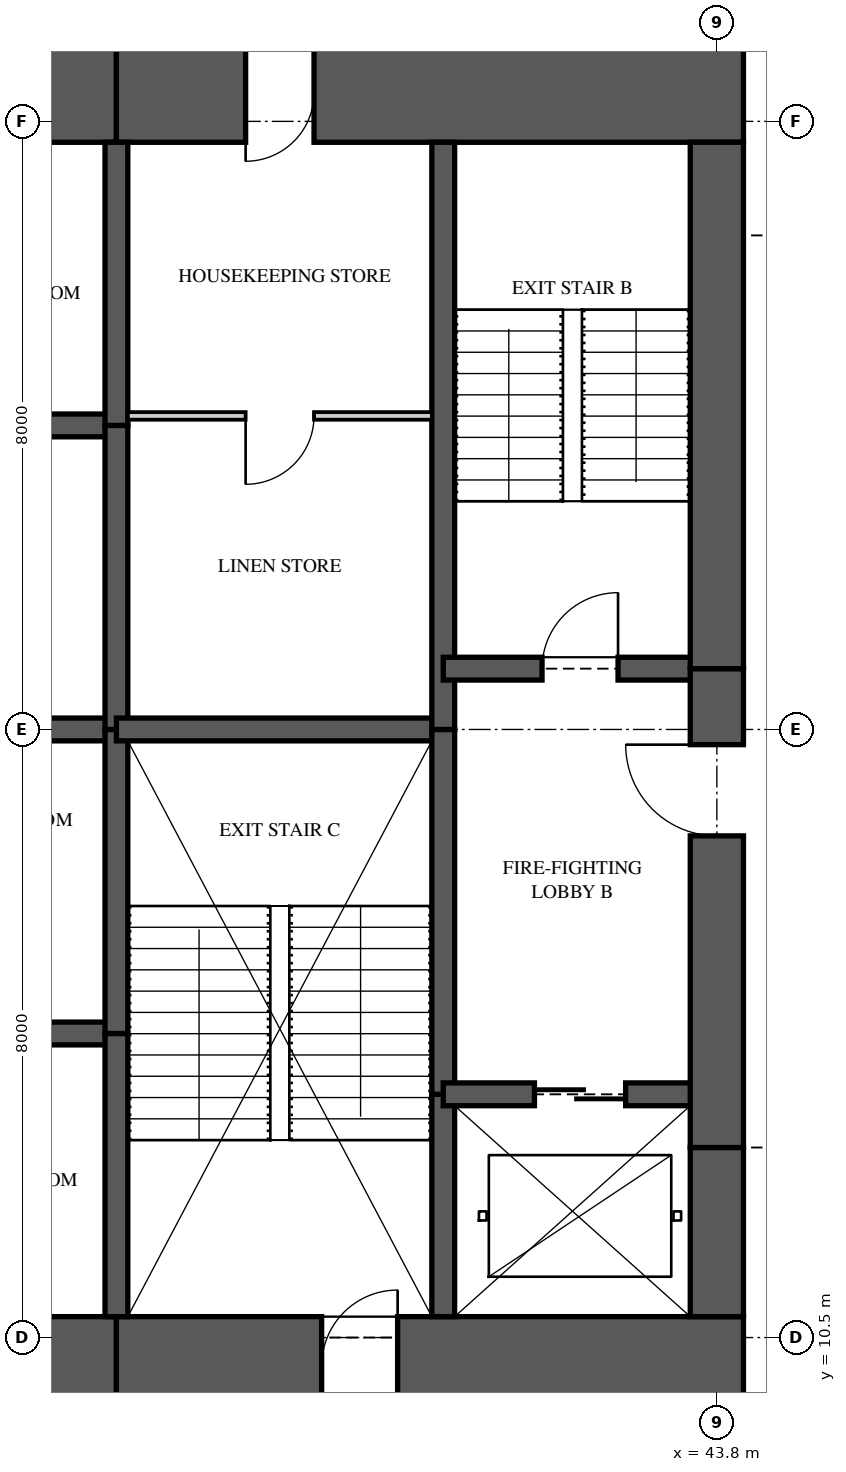
"""IFC4 building model, lengths in metres.
Left out: names, types, materials, properties, quantities, classifications, styles, units other than length and angle.
Written with IfcOpenShell. Run it as: python <this file> out.ifc"""

import sys

from ifc_helpers import new_model, si_unit, direction, frame, frame_2d, origin, place, context, subcontext, project, spatial, rectangle, extrude, element, fill, save


model = new_model("IFC4")
c1 = context("Model", 3, precision=1e-05, world=origin(), true_north=direction((0.0, 1.0)))
c2 = subcontext(c1, "Body", "Model", "MODEL_VIEW")
j1 = project(units=[si_unit("LENGTHUNIT", "METRE"), si_unit("PLANEANGLEUNIT", "RADIAN")], contexts=[c1])
p1 = place(None, origin())
s1 = spatial("IfcSite", under=j1, at=p1, CompositionType="ELEMENT")
p2 = place(p1, origin())
s2 = spatial("IfcBuilding", under=s1, at=p2, CompositionType="ELEMENT")
p3 = place(p2, frame((0.0, 0.0, 184.5)))
s3 = spatial("IfcBuildingStorey", under=s2, at=p3, CompositionType="ELEMENT", Elevation=184.5)
p4 = place(p3, frame((31.6, 10.125, 0.0), z_axis=(0.0, 0.0, 1.0), x_axis=(1.0, 0.0, 0.0)))
e1 = element("IfcWall", 1, at=p4, inside=s3, PredefinedType="SHEAR", context=c2, shape_type="SweptSolid", body=[
    extrude(rectangle(XDim=4.3, YDim=1.3, at=frame_2d((2.15, 0.0))), origin(), (0.0, 0.0, 1.0), 3.35),
])
p5 = place(p3, frame((35.9, 10.125, 0.0), z_axis=(0.0, 0.0, 1.0), x_axis=(1.0, 0.0, 0.0)))
e2 = element("IfcWall", 2, at=p5, inside=s3, PredefinedType="SHEAR", context=c2, shape_type="SweptSolid", body=[
    extrude(rectangle(XDim=8.25, YDim=1.3, at=frame_2d((4.125, 0.0))), origin(), (0.0, 0.0, 1.0), 3.35),
])
p6 = place(p5, frame((2.7, 0.0, 0.0)))
e3 = element("IfcOpeningElement", 3, at=p6, cuts=e2, PredefinedType="OPENING", context=c2, shape_type="SweptSolid", body=[
    extrude(rectangle(XDim=1.0, YDim=2.1, at=frame_2d((0.5, 1.05))), frame((0.0, 0.66, 0.0), z_axis=(0.0, -1.0, 0.0), x_axis=(1.0, 0.0, 0.0)), (0.0, 0.0, 1.0), 1.32),
])
p7 = place(p3, frame((44.15, 26.875, 0.0), z_axis=(0.0, 0.0, 1.0), x_axis=(-1.0, 0.0, 0.0)))
e4 = element("IfcWall", 4, at=p7, inside=s3, PredefinedType="SHEAR", context=c2, shape_type="SweptSolid", body=[
    extrude(rectangle(XDim=8.25, YDim=1.3, at=frame_2d((4.125, 0.0))), origin(), (0.0, 0.0, 1.0), 3.35),
])
p8 = place(p7, frame((5.65, 0.0, 0.0)))
e5 = element("IfcOpeningElement", 5, at=p8, cuts=e4, PredefinedType="OPENING", context=c2, shape_type="SweptSolid", body=[
    extrude(rectangle(XDim=0.9, YDim=2.1, at=frame_2d((0.45, 1.05))), frame((0.0, 0.66, 0.0), z_axis=(0.0, -1.0, 0.0), x_axis=(1.0, 0.0, 0.0)), (0.0, 0.0, 1.0), 1.32),
])
p9 = place(p3, frame((35.9, 26.875, 0.0), z_axis=(0.0, 0.0, 1.0), x_axis=(-1.0, 0.0, 0.0)))
e6 = element("IfcWall", 6, at=p9, inside=s3, PredefinedType="SHEAR", context=c2, shape_type="SweptSolid", body=[
    extrude(rectangle(XDim=4.3, YDim=1.3, at=frame_2d((2.15, 0.0))), origin(), (0.0, 0.0, 1.0), 3.35),
])
p10 = place(p3, frame((43.8, 10.775, 0.0), z_axis=(0.0, 0.0, 1.0), x_axis=(0.0, 1.0, 0.0)))
e7 = element("IfcWall", 7, at=p10, inside=s3, PredefinedType="SHEAR", context=c2, shape_type="SweptSolid", body=[
    extrude(rectangle(XDim=2.225, YDim=0.7, at=frame_2d((1.113, 0.0))), origin(), (0.0, 0.0, 1.0), 3.35),
])
p11 = place(p3, frame((43.8, 13.0, 0.0), z_axis=(0.0, 0.0, 1.0), x_axis=(0.0, 1.0, 0.0)))
e8 = element("IfcWall", 8, at=p11, inside=s3, PredefinedType="SHEAR", context=c2, shape_type="SweptSolid", body=[
    extrude(rectangle(XDim=6.3, YDim=0.7, at=frame_2d((3.15, 0.0))), origin(), (0.0, 0.0, 1.0), 3.35),
])
p12 = place(p11, frame((4.1, 0.0, 0.0)))
e9 = element("IfcOpeningElement", 9, at=p12, cuts=e8, PredefinedType="OPENING", context=c2, shape_type="SweptSolid", body=[
    extrude(rectangle(XDim=1.2, YDim=2.2, at=frame_2d((0.6, 1.1))), frame((0.0, 0.36, 0.0), z_axis=(0.0, -1.0, 0.0), x_axis=(1.0, 0.0, 0.0)), (0.0, 0.0, 1.0), 0.72),
])
p13 = place(p3, frame((43.8, 19.3, 0.0), z_axis=(0.0, 0.0, 1.0), x_axis=(0.0, 1.0, 0.0)))
e10 = element("IfcWall", 10, at=p13, inside=s3, PredefinedType="SHEAR", context=c2, shape_type="SweptSolid", body=[
    extrude(rectangle(XDim=6.925, YDim=0.7, at=frame_2d((3.462, 0.0))), origin(), (0.0, 0.0, 1.0), 3.35),
])
p14 = place(p3, frame((35.9, 10.775, 0.0), z_axis=(0.0, 0.0, 1.0), x_axis=(0.0, 1.0, 0.0)))
e11 = element("IfcWall", 11, at=p14, inside=s3, PredefinedType="SHEAR", context=c2, shape_type="SweptSolid", body=[
    extrude(rectangle(XDim=3.725, YDim=0.3, at=frame_2d((1.863, 0.0))), origin(), (0.0, 0.0, 1.0), 3.35),
])
for number, where, z_axis, x_axis in (
    (12, (35.9, 14.5, 0.0), (0.0, 0.0, 1.0), (0.0, 1.0, 0.0)),
    (13, (35.9, 18.5, 0.0), (0.0, 0.0, 1.0), (0.0, 1.0, 0.0)),
):
    element("IfcWall", number, at=place(p3, frame(where, z_axis=z_axis, x_axis=x_axis)), inside=s3, PredefinedType="SHEAR", context=c2, shape_type="SweptSolid", body=[
        extrude(rectangle(XDim=4.0, YDim=0.3, at=frame_2d((2.0, 0.0))), origin(), (0.0, 0.0, 1.0), 3.35),
    ])
p15 = place(p3, frame((35.9, 22.5, 0.0), z_axis=(0.0, 0.0, 1.0), x_axis=(0.0, 1.0, 0.0)))
e14 = element("IfcWall", 14, at=p15, inside=s3, PredefinedType="SHEAR", context=c2, shape_type="SweptSolid", body=[
    extrude(rectangle(XDim=3.725, YDim=0.3, at=frame_2d((1.863, 0.0))), origin(), (0.0, 0.0, 1.0), 3.35),
])
p16 = place(p3, frame((40.2, 10.775, 0.0), z_axis=(0.0, 0.0, 1.0), x_axis=(0.0, 1.0, 0.0)))
e15 = element("IfcWall", 15, at=p16, inside=s3, PredefinedType="SHEAR", context=c2, shape_type="SweptSolid", body=[
    extrude(rectangle(XDim=2.925, YDim=0.3, at=frame_2d((1.462, 0.0))), origin(), (0.0, 0.0, 1.0), 3.35),
])
p17 = place(p3, frame((40.2, 13.7, 0.0), z_axis=(0.0, 0.0, 1.0), x_axis=(0.0, 1.0, 0.0)))
e16 = element("IfcWall", 16, at=p17, inside=s3, PredefinedType="SHEAR", context=c2, shape_type="SweptSolid", body=[
    extrude(rectangle(XDim=4.8, YDim=0.3, at=frame_2d((2.4, 0.0))), origin(), (0.0, 0.0, 1.0), 3.35),
])
p18 = place(p3, frame((40.2, 18.5, 0.0), z_axis=(0.0, 0.0, 1.0), x_axis=(0.0, 1.0, 0.0)))
e17 = element("IfcWall", 17, at=p18, inside=s3, PredefinedType="SHEAR", context=c2, shape_type="SweptSolid", body=[
    extrude(rectangle(XDim=7.725, YDim=0.3, at=frame_2d((3.863, 0.0))), origin(), (0.0, 0.0, 1.0), 3.35),
])
for number, where, z_axis, x_axis in (
    (18, (31.6, 14.5, 0.0), (0.0, 0.0, 1.0), (1.0, 0.0, 0.0)),
    (19, (31.6, 18.5, 0.0), (0.0, 0.0, 1.0), (1.0, 0.0, 0.0)),
    (20, (31.6, 22.5, 0.0), (0.0, 0.0, 1.0), (1.0, 0.0, 0.0)),
):
    element("IfcWall", number, at=place(p3, frame(where, z_axis=z_axis, x_axis=x_axis)), inside=s3, PredefinedType="SHEAR", context=c2, shape_type="SweptSolid", body=[
        extrude(rectangle(XDim=4.3, YDim=0.3, at=frame_2d((2.15, 0.0))), origin(), (0.0, 0.0, 1.0), 3.35),
    ])
p19 = place(p3, frame((35.9, 18.5, 0.0), z_axis=(0.0, 0.0, 1.0), x_axis=(1.0, 0.0, 0.0)))
e21 = element("IfcWall", 21, at=p19, inside=s3, PredefinedType="SHEAR", context=c2, shape_type="SweptSolid", body=[
    extrude(rectangle(XDim=4.3, YDim=0.3, at=frame_2d((2.15, 0.0))), origin(), (0.0, 0.0, 1.0), 3.35),
])
p20 = place(p3, frame((40.2, 13.7, 0.0), z_axis=(0.0, 0.0, 1.0), x_axis=(1.0, 0.0, 0.0)))
e22 = element("IfcWall", 22, at=p20, inside=s3, PredefinedType="SHEAR", context=c2, shape_type="SweptSolid", body=[
    extrude(rectangle(XDim=3.6, YDim=0.3, at=frame_2d((1.8, 0.0))), origin(), (0.0, 0.0, 1.0), 3.35),
])
p21 = place(p20, frame((1.2, 0.0, 0.0)))
e23 = element("IfcOpeningElement", 23, at=p21, cuts=e22, PredefinedType="OPENING", context=c2, shape_type="SweptSolid", body=[
    extrude(rectangle(XDim=1.2, YDim=2.1, at=frame_2d((0.6, 1.05))), frame((0.0, 0.16, 0.0), z_axis=(0.0, -1.0, 0.0), x_axis=(1.0, 0.0, 0.0)), (0.0, 0.0, 1.0), 0.32),
])
p22 = place(p3, frame((40.2, 19.3, 0.0), z_axis=(0.0, 0.0, 1.0), x_axis=(1.0, 0.0, 0.0)))
e24 = element("IfcWall", 24, at=p22, inside=s3, PredefinedType="SHEAR", context=c2, shape_type="SweptSolid", body=[
    extrude(rectangle(XDim=3.6, YDim=0.3, at=frame_2d((1.8, 0.0))), origin(), (0.0, 0.0, 1.0), 3.35),
])
p23 = place(p22, frame((1.3, 0.0, 0.0)))
e25 = element("IfcOpeningElement", 25, at=p23, cuts=e24, PredefinedType="OPENING", context=c2, shape_type="SweptSolid", body=[
    extrude(rectangle(XDim=1.0, YDim=2.1, at=frame_2d((0.5, 1.05))), frame((0.0, 0.16, 0.0), z_axis=(0.0, -1.0, 0.0), x_axis=(1.0, 0.0, 0.0)), (0.0, 0.0, 1.0), 0.32),
])
p24 = place(p3, frame((36.05, 22.625, 0.0), z_axis=(0.0, 0.0, 1.0), x_axis=(1.0, 0.0, 0.0)))
e26 = element("IfcWall", 26, at=p24, inside=s3, PredefinedType="PARTITIONING", context=c2, shape_type="SweptSolid", body=[
    extrude(rectangle(XDim=4.0, YDim=0.1, at=frame_2d((2.0, 0.0))), origin(), (0.0, 0.0, 1.0), 3.11),
])
p25 = place(p24, frame((1.55, 0.0, 0.0)))
e27 = element("IfcOpeningElement", 27, at=p25, cuts=e26, PredefinedType="OPENING", context=c2, shape_type="SweptSolid", body=[
    extrude(rectangle(XDim=0.9, YDim=2.1, at=frame_2d((0.45, 1.05))), frame((0.0, 0.06, 0.0), z_axis=(0.0, -1.0, 0.0), x_axis=(1.0, 0.0, 0.0)), (0.0, 0.0, 1.0), 0.12),
])
p26 = place(p25, frame((0.9, 0.0, 0.0), z_axis=(0.0, 0.0, 1.0), x_axis=(-1.0, 0.0, 0.0)))
e28 = element("IfcDoor", 28, at=p26, inside=s3, OperationType="SINGLE_SWING_RIGHT", PredefinedType="DOOR", context=c2, shape_type="SweptSolid", body=[
    extrude(rectangle(XDim=0.9, YDim=2.1, at=frame_2d((0.45, 1.05))), frame((0.0, 0.025, 0.0), z_axis=(0.0, -1.0, 0.0), x_axis=(1.0, 0.0, 0.0)), (0.0, 0.0, 1.0), 0.05),
])
fill(e27, e28)
p27 = place(p23, origin())
e29 = element("IfcDoor", 29, at=p27, inside=s3, OperationType="SINGLE_SWING_RIGHT", PredefinedType="DOOR", context=c2, shape_type="SweptSolid", body=[
    extrude(rectangle(XDim=1.0, YDim=2.1, at=frame_2d((0.5, 1.05))), frame((0.0, 0.025, 0.0), z_axis=(0.0, -1.0, 0.0), x_axis=(1.0, 0.0, 0.0)), (0.0, 0.0, 1.0), 0.05),
])
fill(e25, e29)
p28 = place(p12, origin())
e30 = element("IfcDoor", 30, at=p28, inside=s3, OperationType="SINGLE_SWING_RIGHT", PredefinedType="DOOR", context=c2, shape_type="SweptSolid", body=[
    extrude(rectangle(XDim=1.2, YDim=2.2, at=frame_2d((0.6, 1.1))), frame((0.0, 0.025, 0.0), z_axis=(0.0, -1.0, 0.0), x_axis=(1.0, 0.0, 0.0)), (0.0, 0.0, 1.0), 0.05),
])
fill(e9, e30)
p29 = place(p21, origin())
e31 = element("IfcDoor", 31, at=p29, inside=s3, OperationType="SLIDING_TO_LEFT", PredefinedType="DOOR", context=c2, shape_type="SweptSolid", body=[
    extrude(rectangle(XDim=1.2, YDim=2.1, at=frame_2d((0.6, 1.05))), frame((0.0, 0.025, 0.0), z_axis=(0.0, -1.0, 0.0), x_axis=(1.0, 0.0, 0.0)), (0.0, 0.0, 1.0), 0.05),
])
fill(e23, e31)
p30 = place(p6, origin())
e32 = element("IfcDoor", 32, at=p30, inside=s3, OperationType="SINGLE_SWING_RIGHT", PredefinedType="DOOR", context=c2, shape_type="SweptSolid", body=[
    extrude(rectangle(XDim=1.0, YDim=2.1, at=frame_2d((0.5, 1.05))), frame((0.0, 0.025, 0.0), z_axis=(0.0, -1.0, 0.0), x_axis=(1.0, 0.0, 0.0)), (0.0, 0.0, 1.0), 0.05),
])
fill(e3, e32)
p31 = place(p8, origin())
e33 = element("IfcDoor", 33, at=p31, inside=s3, OperationType="SINGLE_SWING_RIGHT", PredefinedType="DOOR", context=c2, shape_type="SweptSolid", body=[
    extrude(rectangle(XDim=0.9, YDim=2.1, at=frame_2d((0.45, 1.05))), frame((0.0, 0.47, 0.0), z_axis=(0.0, -1.0, 0.0), x_axis=(1.0, 0.0, 0.0)), (0.0, 0.0, 1.0), 0.8),
])
fill(e5, e33)
save(model, sys.argv[1])
